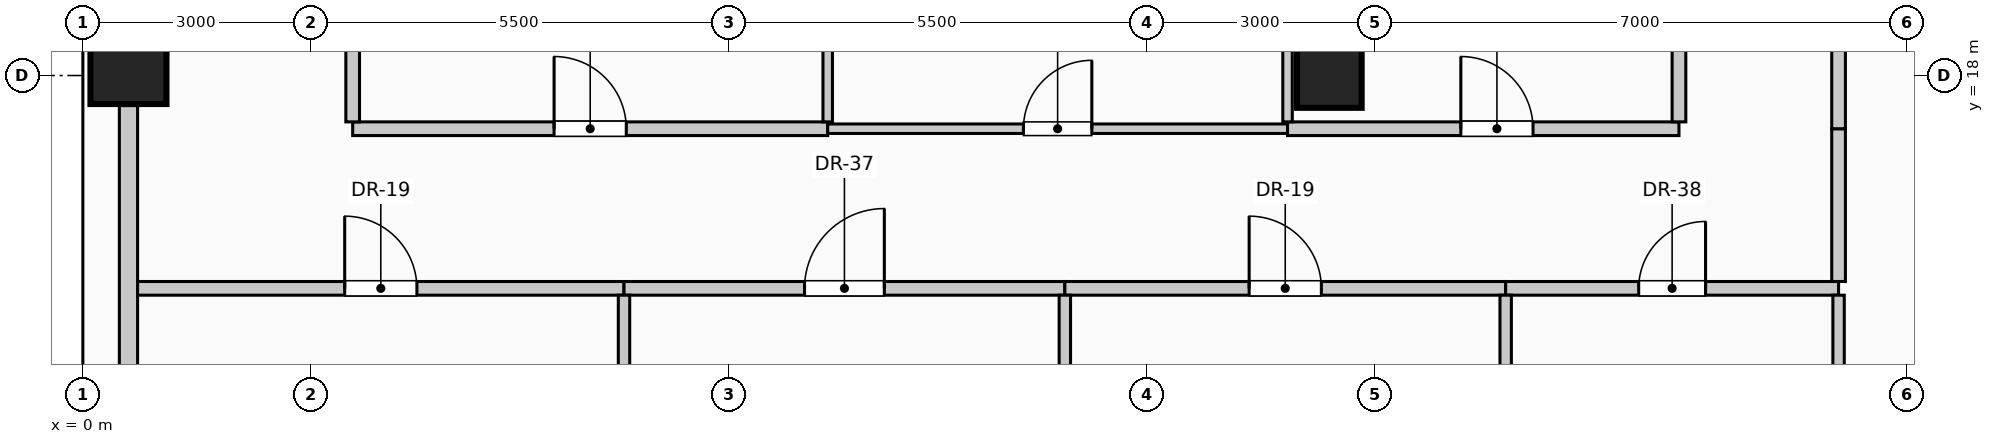
"""IFC4 building model, lengths in metres.
Left out: names, types, materials, properties, quantities, classifications, styles, units other than length and angle.
Written with IfcOpenShell. Run it as: python <this file> out.ifc"""

import sys

from ifc_helpers import new_model, si_unit, direction, frame, frame_2d, origin, origin_2d, place, context, subcontext, project, spatial, rectangle, circle, extrude, element, fill, save


model = new_model("IFC4")
c1 = context("Model", 3, precision=1e-05, world=origin(), true_north=direction((0.0, 1.0)))
c2 = subcontext(c1, "Body", "Model", "MODEL_VIEW")
j1 = project(units=[si_unit("LENGTHUNIT", "METRE"), si_unit("PLANEANGLEUNIT", "RADIAN")], contexts=[c1])
p1 = place(None, origin())
s1 = spatial("IfcSite", under=j1, at=p1, CompositionType="ELEMENT")
p2 = place(p1, origin())
s2 = spatial("IfcBuilding", under=s1, at=p2, CompositionType="ELEMENT")
p3 = place(p2, frame((0.0, 0.0, 248.6)))
s3 = spatial("IfcBuildingStorey", under=s2, at=p3, CompositionType="ELEMENT", Elevation=248.6)
p4 = place(p3, frame((0.6, 18.0, 0.0), z_axis=(0.0, 0.0, 1.0), x_axis=(0.0, 1.0, 0.0)))
e1 = element("IfcColumn", 1, at=p4, inside=s3, PredefinedType="COLUMN", context=c2, shape_type="SweptSolid", body=[
    extrude(rectangle(XDim=0.75, YDim=1.0, at=origin_2d()), origin(), (0.0, 0.0, 1.0), 4.0),
])
p5 = place(p3, frame((16.4, 18.0, 0.0), z_axis=(0.0, 0.0, 1.0), x_axis=(1.0, 0.0, 0.0)))
e2 = element("IfcColumn", 2, at=p5, inside=s3, PredefinedType="COLUMN", context=c2, shape_type="SweptSolid", body=[
    extrude(circle(Radius=0.425, at=origin_2d()), origin(), (0.0, 0.0, 1.0), 4.0),
])
p6 = place(p3, frame((0.6, 10.395, 0.0), z_axis=(0.0, 0.0, 1.0), x_axis=(0.0, 1.0, 0.0)))
e3 = element("IfcWall", 3, at=p6, inside=s3, PredefinedType="SOLIDWALL", context=c2, shape_type="SweptSolid", body=[
    extrude(rectangle(XDim=7.21, YDim=0.24, at=frame_2d((3.605, 0.0))), origin(), (0.0, 0.0, 1.0), 3.0),
])
p7 = place(p6, frame((1.203, 0.0, 0.42)))
e4 = element("IfcOpeningElement", 4, at=p7, cuts=e3, PredefinedType="OPENING", context=c2, shape_type="SweptSolid", body=[
    extrude(rectangle(XDim=1.8, YDim=2.2, at=frame_2d((0.9, 1.1))), frame((0.0, 0.13, 0.0), z_axis=(0.0, -1.0, 0.0), x_axis=(1.0, 0.0, 0.0)), (0.0, 0.0, 1.0), 0.26),
])
p8 = place(p3, frame((0.72, 15.2, 0.0), z_axis=(0.0, 0.0, 1.0), x_axis=(1.0, 0.0, 0.0)))
e5 = element("IfcWall", 5, at=p8, inside=s3, PredefinedType="PARTITIONING", context=c2, shape_type="SweptSolid", body=[
    extrude(rectangle(XDim=6.4, YDim=0.18, at=frame_2d((3.2, 0.0))), origin(), (0.0, 0.0, 1.0), 3.75),
])
p9 = place(p8, frame((2.725, 0.0, 0.0)))
e6 = element("IfcOpeningElement", 6, at=p9, cuts=e5, PredefinedType="OPENING", context=c2, shape_type="SweptSolid", body=[
    extrude(rectangle(XDim=0.95, YDim=2.15, at=frame_2d((0.475, 1.075))), frame((0.0, 0.1, 0.0), z_axis=(0.0, -1.0, 0.0), x_axis=(1.0, 0.0, 0.0)), (0.0, 0.0, 1.0), 0.2),
])
p10 = place(p3, frame((7.12, 15.2, 0.0), z_axis=(0.0, 0.0, 1.0), x_axis=(1.0, 0.0, 0.0)))
e7 = element("IfcWall", 7, at=p10, inside=s3, PredefinedType="PARTITIONING", context=c2, shape_type="SweptSolid", body=[
    extrude(rectangle(XDim=5.8, YDim=0.18, at=frame_2d((2.9, 0.0))), origin(), (0.0, 0.0, 1.0), 3.75),
])
p11 = place(p10, frame((2.375, 0.0, 0.0)))
e8 = element("IfcOpeningElement", 8, at=p11, cuts=e7, PredefinedType="OPENING", context=c2, shape_type="SweptSolid", body=[
    extrude(rectangle(XDim=1.05, YDim=2.15, at=frame_2d((0.525, 1.075))), frame((0.0, 0.1, 0.0), z_axis=(0.0, -1.0, 0.0), x_axis=(1.0, 0.0, 0.0)), (0.0, 0.0, 1.0), 0.2),
])
p12 = place(p3, frame((12.92, 15.2, 0.0), z_axis=(0.0, 0.0, 1.0), x_axis=(1.0, 0.0, 0.0)))
e9 = element("IfcWall", 9, at=p12, inside=s3, PredefinedType="PARTITIONING", context=c2, shape_type="SweptSolid", body=[
    extrude(rectangle(XDim=5.8, YDim=0.18, at=frame_2d((2.9, 0.0))), origin(), (0.0, 0.0, 1.0), 3.75),
])
p13 = place(p12, frame((2.425, 0.0, 0.0)))
e10 = element("IfcOpeningElement", 10, at=p13, cuts=e9, PredefinedType="OPENING", context=c2, shape_type="SweptSolid", body=[
    extrude(rectangle(XDim=0.95, YDim=2.15, at=frame_2d((0.475, 1.075))), frame((0.0, 0.1, 0.0), z_axis=(0.0, -1.0, 0.0), x_axis=(1.0, 0.0, 0.0)), (0.0, 0.0, 1.0), 0.2),
])
p14 = place(p3, frame((18.72, 15.2, 0.0), z_axis=(0.0, 0.0, 1.0), x_axis=(1.0, 0.0, 0.0)))
e11 = element("IfcWall", 11, at=p14, inside=s3, PredefinedType="PARTITIONING", context=c2, shape_type="SweptSolid", body=[
    extrude(rectangle(XDim=4.38, YDim=0.18, at=frame_2d((2.19, 0.0))), origin(), (0.0, 0.0, 1.0), 3.75),
])
p15 = place(p14, frame((1.75, 0.0, 0.0)))
e12 = element("IfcOpeningElement", 12, at=p15, cuts=e11, PredefinedType="OPENING", context=c2, shape_type="SweptSolid", body=[
    extrude(rectangle(XDim=0.88, YDim=2.1, at=frame_2d((0.44, 1.05))), frame((0.0, 0.1, 0.0), z_axis=(0.0, -1.0, 0.0), x_axis=(1.0, 0.0, 0.0)), (0.0, 0.0, 1.0), 0.2),
])
p16 = place(p3, frame((3.55, 17.3, 0.0), z_axis=(0.0, 0.0, 1.0), x_axis=(1.0, 0.0, 0.0)))
e13 = element("IfcWall", 13, at=p16, inside=s3, PredefinedType="PARTITIONING", context=c2, shape_type="SweptSolid", body=[
    extrude(rectangle(XDim=6.25, YDim=0.18, at=frame_2d((3.125, 0.0))), origin(), (0.0, 0.0, 1.0), 3.75),
])
p17 = place(p16, frame((2.65, 0.0, 0.0)))
e14 = element("IfcOpeningElement", 14, at=p17, cuts=e13, PredefinedType="OPENING", context=c2, shape_type="SweptSolid", body=[
    extrude(rectangle(XDim=0.95, YDim=2.15, at=frame_2d((0.475, 1.075))), frame((0.0, 0.1, 0.0), z_axis=(0.0, -1.0, 0.0), x_axis=(1.0, 0.0, 0.0)), (0.0, 0.0, 1.0), 0.2),
])
p18 = place(p3, frame((9.8, 17.3, 0.0), z_axis=(0.0, 0.0, 1.0), x_axis=(1.0, 0.0, 0.0)))
e15 = element("IfcWall", 15, at=p18, inside=s3, PredefinedType="PARTITIONING", context=c2, shape_type="SweptSolid", body=[
    extrude(rectangle(XDim=6.05, YDim=0.125, at=frame_2d((3.025, 0.0))), origin(), (0.0, 0.0, 1.0), 3.75),
])
p19 = place(p18, frame((2.575, 0.0, 0.0)))
e16 = element("IfcOpeningElement", 16, at=p19, cuts=e15, PredefinedType="OPENING", context=c2, shape_type="SweptSolid", body=[
    extrude(rectangle(XDim=0.9, YDim=2.1, at=frame_2d((0.45, 1.05))), frame((0.0, 0.073, 0.0), z_axis=(0.0, -1.0, 0.0), x_axis=(1.0, 0.0, 0.0)), (0.0, 0.0, 1.0), 0.145),
])
p20 = place(p3, frame((15.85, 17.3, 0.0), z_axis=(0.0, 0.0, 1.0), x_axis=(1.0, 0.0, 0.0)))
e17 = element("IfcWall", 17, at=p20, inside=s3, PredefinedType="PARTITIONING", context=c2, shape_type="SweptSolid", body=[
    extrude(rectangle(XDim=5.15, YDim=0.18, at=frame_2d((2.575, 0.0))), origin(), (0.0, 0.0, 1.0), 3.75),
])
p21 = place(p20, frame((2.28, 0.0, 0.0)))
e18 = element("IfcOpeningElement", 18, at=p21, cuts=e17, PredefinedType="OPENING", context=c2, shape_type="SweptSolid", body=[
    extrude(rectangle(XDim=0.95, YDim=2.15, at=frame_2d((0.475, 1.075))), frame((0.0, 0.1, 0.0), z_axis=(0.0, -1.0, 0.0), x_axis=(1.0, 0.0, 0.0)), (0.0, 0.0, 1.0), 0.2),
])
p22 = place(p3, frame((3.55, 17.39, 0.0), z_axis=(0.0, 0.0, 1.0), x_axis=(0.0, 1.0, 0.0)))
e19 = element("IfcWall", 19, at=p22, inside=s3, PredefinedType="PARTITIONING", context=c2, shape_type="SweptSolid", body=[
    extrude(rectangle(XDim=7.335, YDim=0.18, at=frame_2d((3.667, 0.0))), origin(), (0.0, 0.0, 1.0), 3.75),
])
p23 = place(p3, frame((7.12, 0.72, 0.0), z_axis=(0.0, 0.0, 1.0), x_axis=(0.0, 1.0, 0.0)))
e20 = element("IfcWall", 20, at=p23, inside=s3, PredefinedType="PARTITIONING", context=c2, shape_type="SweptSolid", body=[
    extrude(rectangle(XDim=14.39, YDim=0.15, at=frame_2d((7.195, 0.0))), origin(), (0.0, 0.0, 1.0), 3.75),
])
p24 = place(p3, frame((9.8, 17.39, 0.0), z_axis=(0.0, 0.0, 1.0), x_axis=(0.0, 1.0, 0.0)))
e21 = element("IfcWall", 21, at=p24, inside=s3, PredefinedType="PARTITIONING", context=c2, shape_type="SweptSolid", body=[
    extrude(rectangle(XDim=7.335, YDim=0.125, at=frame_2d((3.667, 0.0))), origin(), (0.0, 0.0, 1.0), 3.75),
])
p25 = place(p3, frame((12.92, 0.72, 0.0), z_axis=(0.0, 0.0, 1.0), x_axis=(0.0, 1.0, 0.0)))
e22 = element("IfcWall", 22, at=p25, inside=s3, PredefinedType="PARTITIONING", context=c2, shape_type="SweptSolid", body=[
    extrude(rectangle(XDim=14.39, YDim=0.15, at=frame_2d((7.195, 0.0))), origin(), (0.0, 0.0, 1.0), 3.75),
])
p26 = place(p3, frame((15.85, 17.39, 0.0), z_axis=(0.0, 0.0, 1.0), x_axis=(0.0, 1.0, 0.0)))
e23 = element("IfcWall", 23, at=p26, inside=s3, PredefinedType="PARTITIONING", context=c2, shape_type="SweptSolid", body=[
    extrude(rectangle(XDim=7.335, YDim=0.125, at=frame_2d((3.667, 0.0))), origin(), (0.0, 0.0, 1.0), 3.75),
])
p27 = place(p3, frame((18.72, 0.72, 0.0), z_axis=(0.0, 0.0, 1.0), x_axis=(0.0, 1.0, 0.0)))
e24 = element("IfcWall", 24, at=p27, inside=s3, PredefinedType="PARTITIONING", context=c2, shape_type="SweptSolid", body=[
    extrude(rectangle(XDim=14.39, YDim=0.15, at=frame_2d((7.195, 0.0))), origin(), (0.0, 0.0, 1.0), 3.75),
])
p28 = place(p3, frame((21.0, 17.39, 0.0), z_axis=(0.0, 0.0, 1.0), x_axis=(0.0, 1.0, 0.0)))
e25 = element("IfcWall", 25, at=p28, inside=s3, PredefinedType="PARTITIONING", context=c2, shape_type="SweptSolid", body=[
    extrude(rectangle(XDim=7.335, YDim=0.18, at=frame_2d((3.667, 0.0))), origin(), (0.0, 0.0, 1.0), 3.75),
])
p29 = place(p3, frame((23.1, 0.72, 0.0), z_axis=(0.0, 0.0, 1.0), x_axis=(0.0, 1.0, 0.0)))
e26 = element("IfcWall", 26, at=p29, inside=s3, PredefinedType="PARTITIONING", context=c2, shape_type="SweptSolid", body=[
    extrude(rectangle(XDim=14.39, YDim=0.15, at=frame_2d((7.195, 0.0))), origin(), (0.0, 0.0, 1.0), 3.75),
])
p30 = place(p3, frame((23.1, 15.29, 0.0), z_axis=(0.0, 0.0, 1.0), x_axis=(0.0, 1.0, 0.0)))
e27 = element("IfcWall", 27, at=p30, inside=s3, PredefinedType="PARTITIONING", context=c2, shape_type="SweptSolid", body=[
    extrude(rectangle(XDim=2.01, YDim=0.18, at=frame_2d((1.005, 0.0))), origin(), (0.0, 0.0, 1.0), 3.75),
])
p31 = place(p3, frame((23.1, 17.3, 0.0), z_axis=(0.0, 0.0, 1.0), x_axis=(0.0, 1.0, 0.0)))
e28 = element("IfcWall", 28, at=p31, inside=s3, PredefinedType="PARTITIONING", context=c2, shape_type="SweptSolid", body=[
    extrude(rectangle(XDim=9.51, YDim=0.18, at=frame_2d((4.755, 0.0))), origin(), (0.0, 0.0, 1.0), 3.75),
])
p32 = place(p9, origin())
e29 = element("IfcDoor", 29, at=p32, inside=s3, OperationType="SINGLE_SWING_LEFT", PredefinedType="DOOR", context=c2, shape_type="SweptSolid", body=[
    extrude(rectangle(XDim=0.95, YDim=2.15, at=frame_2d((0.475, 1.075))), frame((0.0, 0.025, 0.0), z_axis=(0.0, -1.0, 0.0), x_axis=(1.0, 0.0, 0.0)), (0.0, 0.0, 1.0), 0.05),
])
fill(e6, e29)
p33 = place(p11, origin())
e30 = element("IfcDoor", 30, at=p33, inside=s3, OperationType="SINGLE_SWING_RIGHT", PredefinedType="DOOR", context=c2, shape_type="SweptSolid", body=[
    extrude(rectangle(XDim=1.05, YDim=2.15, at=frame_2d((0.525, 1.075))), frame((0.0, 0.025, 0.0), z_axis=(0.0, -1.0, 0.0), x_axis=(1.0, 0.0, 0.0)), (0.0, 0.0, 1.0), 0.05),
])
fill(e8, e30)
p34 = place(p13, origin())
e31 = element("IfcDoor", 31, at=p34, inside=s3, OperationType="SINGLE_SWING_LEFT", PredefinedType="DOOR", context=c2, shape_type="SweptSolid", body=[
    extrude(rectangle(XDim=0.95, YDim=2.15, at=frame_2d((0.475, 1.075))), frame((0.0, 0.025, 0.0), z_axis=(0.0, -1.0, 0.0), x_axis=(1.0, 0.0, 0.0)), (0.0, 0.0, 1.0), 0.05),
])
fill(e10, e31)
p35 = place(p15, origin())
e32 = element("IfcDoor", 32, at=p35, inside=s3, OperationType="SINGLE_SWING_RIGHT", PredefinedType="DOOR", context=c2, shape_type="SweptSolid", body=[
    extrude(rectangle(XDim=0.88, YDim=2.1, at=frame_2d((0.44, 1.05))), frame((0.0, 0.025, 0.0), z_axis=(0.0, -1.0, 0.0), x_axis=(1.0, 0.0, 0.0)), (0.0, 0.0, 1.0), 0.05),
])
fill(e12, e32)
p36 = place(p17, origin())
e33 = element("IfcDoor", 33, at=p36, inside=s3, OperationType="SINGLE_SWING_LEFT", PredefinedType="DOOR", context=c2, shape_type="SweptSolid", body=[
    extrude(rectangle(XDim=0.95, YDim=2.15, at=frame_2d((0.475, 1.075))), frame((0.0, 0.025, 0.0), z_axis=(0.0, -1.0, 0.0), x_axis=(1.0, 0.0, 0.0)), (0.0, 0.0, 1.0), 0.05),
])
fill(e14, e33)
p37 = place(p19, origin())
e34 = element("IfcDoor", 34, at=p37, inside=s3, OperationType="SINGLE_SWING_RIGHT", PredefinedType="DOOR", context=c2, shape_type="SweptSolid", body=[
    extrude(rectangle(XDim=0.9, YDim=2.1, at=frame_2d((0.45, 1.05))), frame((0.0, 0.025, 0.0), z_axis=(0.0, -1.0, 0.0), x_axis=(1.0, 0.0, 0.0)), (0.0, 0.0, 1.0), 0.05),
])
fill(e16, e34)
p38 = place(p21, origin())
e35 = element("IfcDoor", 35, at=p38, inside=s3, OperationType="SINGLE_SWING_LEFT", PredefinedType="DOOR", context=c2, shape_type="SweptSolid", body=[
    extrude(rectangle(XDim=0.95, YDim=2.15, at=frame_2d((0.475, 1.075))), frame((0.0, 0.025, 0.0), z_axis=(0.0, -1.0, 0.0), x_axis=(1.0, 0.0, 0.0)), (0.0, 0.0, 1.0), 0.05),
])
fill(e18, e35)
save(model, sys.argv[1])
